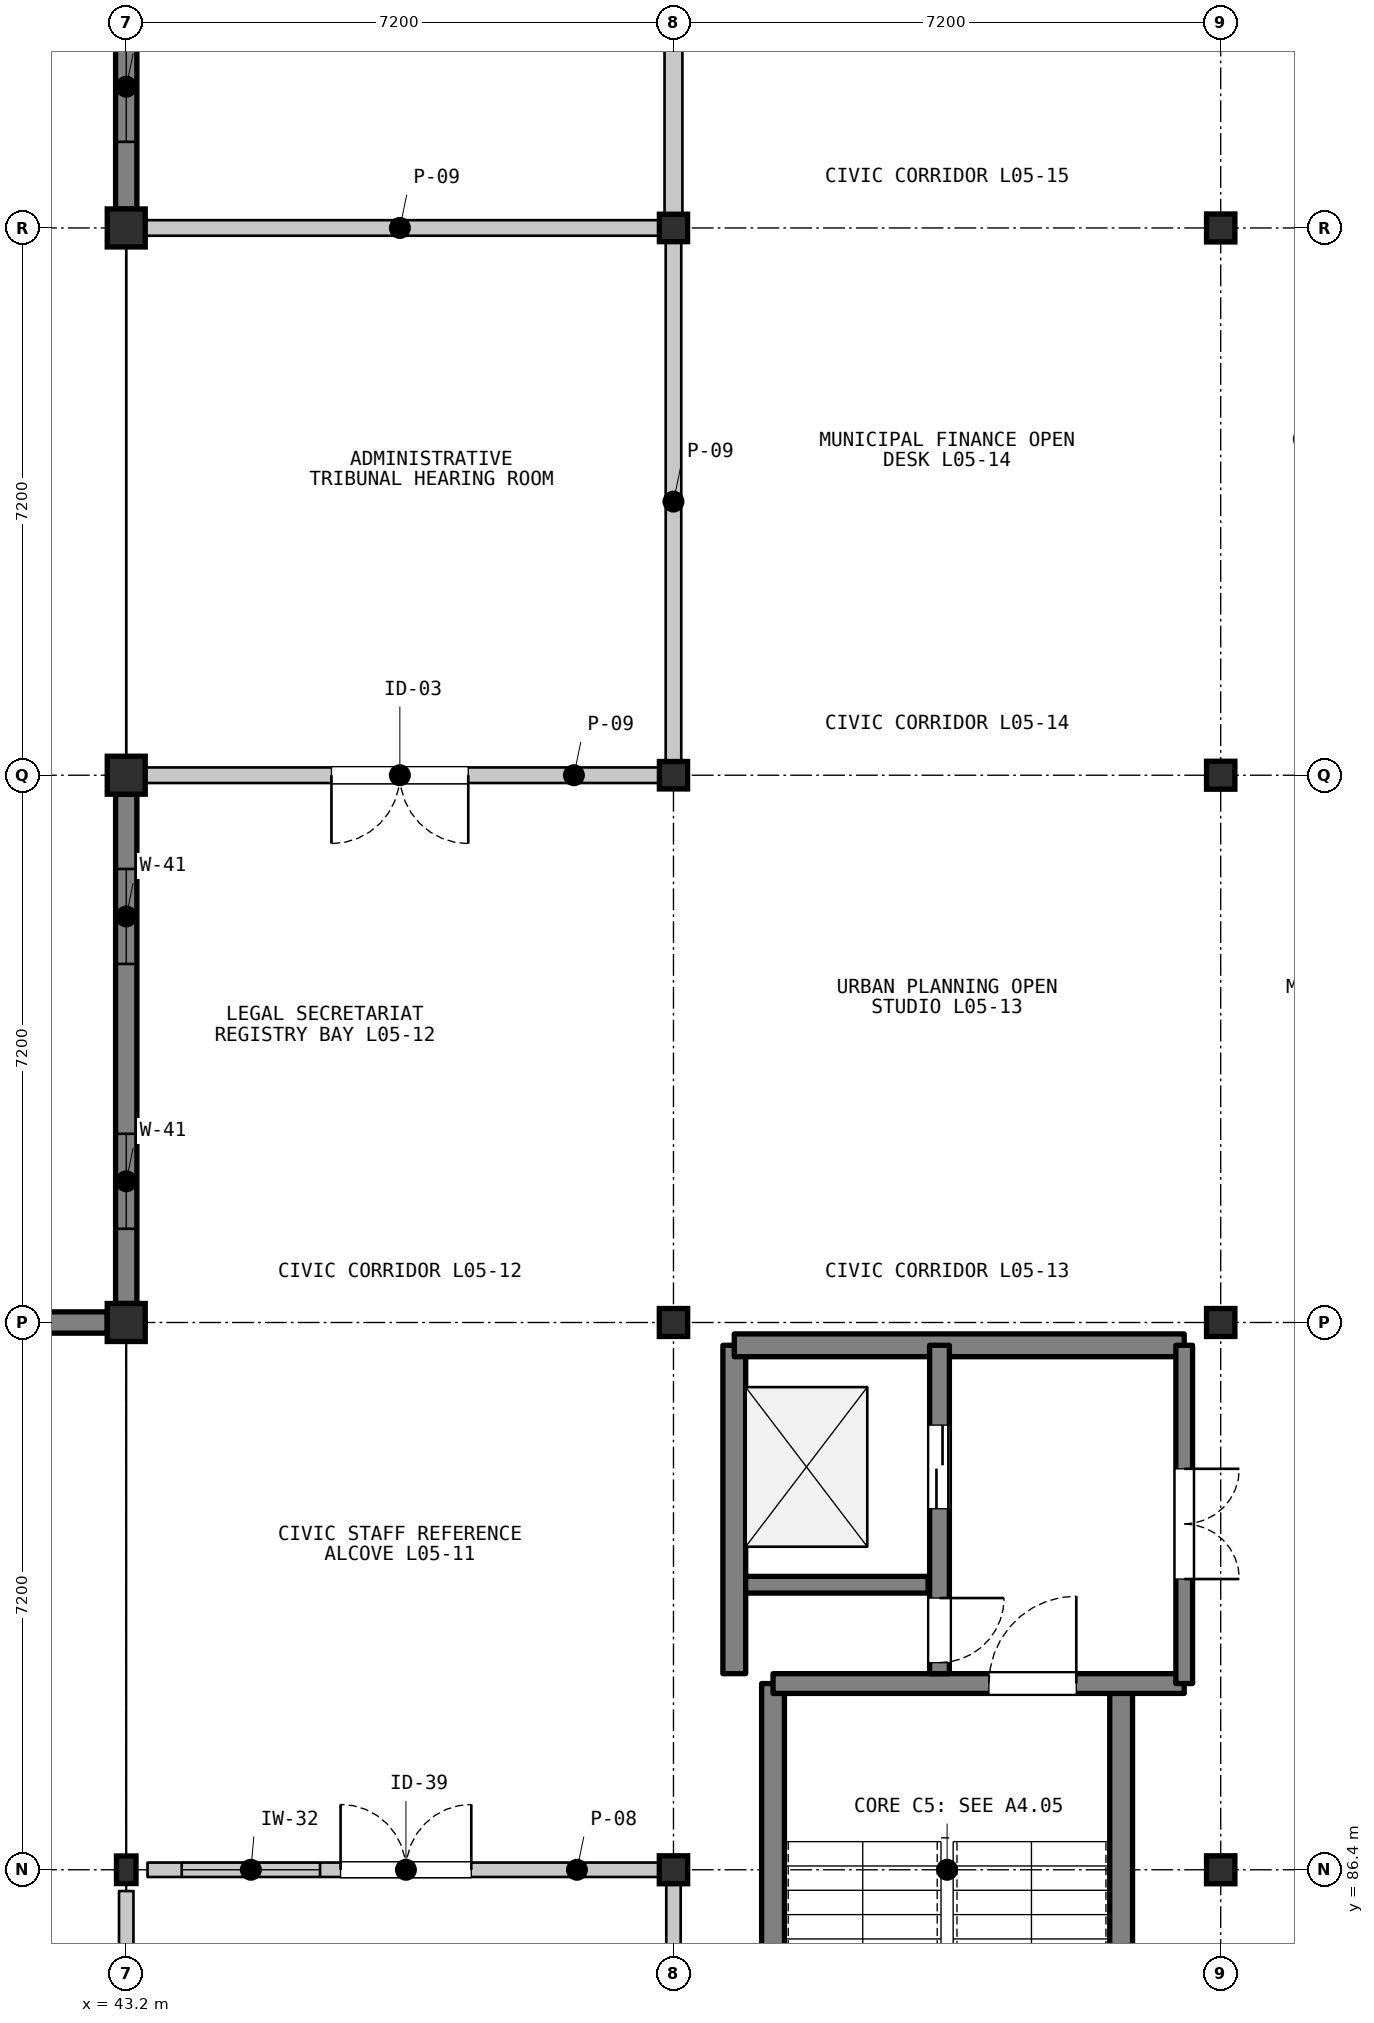
"""IFC4 building model, lengths in metres.
Left out: names, types, materials, properties, quantities, classifications, styles, units other than length and angle.
Written with IfcOpenShell. Run it as: python <this file> out.ifc"""

import sys

from ifc_helpers import new_model, si_unit, direction, frame, frame_2d, origin, origin_2d, place, context, subcontext, project, spatial, rectangle, i_section, extrude, element, fill, save


model = new_model("IFC4")
c1 = context("Model", 3, precision=1e-05, world=origin(), true_north=direction((0.0, 1.0)))
c2 = subcontext(c1, "Body", "Model", "MODEL_VIEW")
j1 = project(units=[si_unit("LENGTHUNIT", "METRE"), si_unit("PLANEANGLEUNIT", "RADIAN")], contexts=[c1])
p1 = place(None, origin())
s1 = spatial("IfcSite", under=j1, at=p1, CompositionType="ELEMENT")
p2 = place(p1, origin())
s2 = spatial("IfcBuilding", under=s1, at=p2, CompositionType="ELEMENT")
p3 = place(p2, frame((0.0, 0.0, 18.0)))
s3 = spatial("IfcBuildingStorey", under=s2, at=p3, CompositionType="ELEMENT", Elevation=18.0)
p4 = place(p3, frame((43.2, 86.4, 0.0), z_axis=(0.0, 0.0, 1.0), x_axis=(1.0, 0.0, 0.0)))
e1 = element("IfcColumn", 1, at=p4, inside=s3, PredefinedType="COLUMN", context=c2, shape_type="SweptSolid", body=[
    extrude(i_section(OverallWidth=0.257, OverallDepth=0.363, WebThickness=0.013, FlangeThickness=0.022, FilletRadius=0.015, at=origin_2d()), origin(), (0.0, 0.0, 1.0), 3.9),
])
for number, where, z_axis, x_axis in (
    (2, (43.2, 93.6, 0.0), (0.0, 0.0, 1.0), (1.0, 0.0, 0.0)),
    (3, (43.2, 100.8, 0.0), (0.0, 0.0, 1.0), (1.0, 0.0, 0.0)),
    (4, (43.2, 108.0, 0.0), (0.0, 0.0, 1.0), (1.0, 0.0, 0.0)),
):
    element("IfcColumn", number, at=place(p3, frame(where, z_axis=z_axis, x_axis=x_axis)), inside=s3, PredefinedType="COLUMN", context=c2, shape_type="SweptSolid", body=[
        extrude(rectangle(XDim=0.5, YDim=0.5, at=origin_2d()), origin(), (0.0, 0.0, 1.0), 3.9),
    ])
for number, where, z_axis, x_axis in (
    (5, (50.4, 86.4, 0.0), (0.0, 0.0, 1.0), (1.0, 0.0, 0.0)),
    (6, (50.4, 93.6, 0.0), (0.0, 0.0, 1.0), (1.0, 0.0, 0.0)),
):
    element("IfcColumn", number, at=place(p3, frame(where, z_axis=z_axis, x_axis=x_axis)), inside=s3, PredefinedType="COLUMN", context=c2, shape_type="SweptSolid", body=[
        extrude(i_section(OverallWidth=0.373, OverallDepth=0.368, WebThickness=0.015, FlangeThickness=0.024, FilletRadius=0.015, at=origin_2d()), origin(), (0.0, 0.0, 1.0), 3.9),
    ])
for number, where, z_axis, x_axis in (
    (7, (50.4, 100.8, 0.0), (0.0, 0.0, 1.0), (1.0, 0.0, 0.0)),
    (8, (50.4, 108.0, 0.0), (0.0, 0.0, 1.0), (1.0, 0.0, 0.0)),
):
    element("IfcColumn", number, at=place(p3, frame(where, z_axis=z_axis, x_axis=x_axis)), inside=s3, PredefinedType="COLUMN", context=c2, shape_type="SweptSolid", body=[
        extrude(i_section(OverallWidth=0.371, OverallDepth=0.361, WebThickness=0.012, FlangeThickness=0.02, FilletRadius=0.015, at=origin_2d()), origin(), (0.0, 0.0, 1.0), 3.9),
    ])
for number, where, z_axis, x_axis in (
    (9, (57.6, 86.4, 0.0), (0.0, 0.0, 1.0), (1.0, 0.0, 0.0)),
    (10, (57.6, 93.6, 0.0), (0.0, 0.0, 1.0), (1.0, 0.0, 0.0)),
    (11, (57.6, 100.8, 0.0), (0.0, 0.0, 1.0), (1.0, 0.0, 0.0)),
    (12, (57.6, 108.0, 0.0), (0.0, 0.0, 1.0), (1.0, 0.0, 0.0)),
):
    element("IfcColumn", number, at=place(p3, frame(where, z_axis=z_axis, x_axis=x_axis)), inside=s3, PredefinedType="COLUMN", context=c2, shape_type="SweptSolid", body=[
        extrude(i_section(OverallWidth=0.373, OverallDepth=0.368, WebThickness=0.015, FlangeThickness=0.024, FilletRadius=0.015, at=origin_2d()), origin(), (0.0, 0.0, 1.0), 3.9),
    ])
p5 = place(p3, frame((36.25, 93.6, 0.0), z_axis=(0.0, 0.0, 1.0), x_axis=(1.0, 0.0, 0.0)))
e13 = element("IfcWall", 13, at=p5, inside=s3, PredefinedType="SOLIDWALL", context=c2, shape_type="SweptSolid", body=[
    extrude(rectangle(XDim=6.7, YDim=0.28, at=frame_2d((3.35, 0.0))), origin(), (0.0, 0.0, 1.0), 3.172),
])
p6 = place(p5, frame((1.008, 0.0, 0.95)))
e14 = element("IfcOpeningElement", 14, at=p6, cuts=e13, PredefinedType="OPENING", context=c2, shape_type="SweptSolid", body=[
    extrude(rectangle(XDim=1.2, YDim=1.7, at=frame_2d((0.6, 0.85))), frame((0.0, 0.15, 0.0), z_axis=(0.0, -1.0, 0.0), x_axis=(1.0, 0.0, 0.0)), (0.0, 0.0, 1.0), 0.3),
])
p7 = place(p5, frame((4.492, 0.0, 0.95)))
e15 = element("IfcOpeningElement", 15, at=p7, cuts=e13, PredefinedType="OPENING", context=c2, shape_type="SweptSolid", body=[
    extrude(rectangle(XDim=1.2, YDim=1.7, at=frame_2d((0.6, 0.85))), frame((0.0, 0.15, 0.0), z_axis=(0.0, -1.0, 0.0), x_axis=(1.0, 0.0, 0.0)), (0.0, 0.0, 1.0), 0.3),
])
p8 = place(p3, frame((43.2, 93.85, 0.0), z_axis=(0.0, 0.0, 1.0), x_axis=(0.0, 1.0, 0.0)))
e16 = element("IfcWall", 16, at=p8, inside=s3, PredefinedType="SOLIDWALL", context=c2, shape_type="SweptSolid", body=[
    extrude(rectangle(XDim=6.7, YDim=0.28, at=frame_2d((3.35, 0.0))), origin(), (0.0, 0.0, 1.0), 3.172),
])
p9 = place(p8, frame((0.983, 0.0, 0.95)))
e17 = element("IfcOpeningElement", 17, at=p9, cuts=e16, PredefinedType="OPENING", context=c2, shape_type="SweptSolid", body=[
    extrude(rectangle(XDim=1.25, YDim=1.85, at=frame_2d((0.625, 0.925))), frame((0.0, 0.15, 0.0), z_axis=(0.0, -1.0, 0.0), x_axis=(1.0, 0.0, 0.0)), (0.0, 0.0, 1.0), 0.3),
])
p10 = place(p8, frame((4.467, 0.0, 0.95)))
e18 = element("IfcOpeningElement", 18, at=p10, cuts=e16, PredefinedType="OPENING", context=c2, shape_type="SweptSolid", body=[
    extrude(rectangle(XDim=1.25, YDim=1.85, at=frame_2d((0.625, 0.925))), frame((0.0, 0.15, 0.0), z_axis=(0.0, -1.0, 0.0), x_axis=(1.0, 0.0, 0.0)), (0.0, 0.0, 1.0), 0.3),
])
p11 = place(p3, frame((43.2, 108.25, 0.0), z_axis=(0.0, 0.0, 1.0), x_axis=(0.0, 1.0, 0.0)))
e19 = element("IfcWall", 19, at=p11, inside=s3, PredefinedType="SOLIDWALL", context=c2, shape_type="SweptSolid", body=[
    extrude(rectangle(XDim=6.7, YDim=0.28, at=frame_2d((3.35, 0.0))), origin(), (0.0, 0.0, 1.0), 3.172),
])
p12 = place(p11, frame((0.883, 0.0, 0.95)))
e20 = element("IfcOpeningElement", 20, at=p12, cuts=e19, PredefinedType="OPENING", context=c2, shape_type="SweptSolid", body=[
    extrude(rectangle(XDim=1.45, YDim=1.85, at=frame_2d((0.725, 0.925))), frame((0.0, 0.15, 0.0), z_axis=(0.0, -1.0, 0.0), x_axis=(1.0, 0.0, 0.0)), (0.0, 0.0, 1.0), 0.3),
])
p13 = place(p11, frame((4.367, 0.0, 0.95)))
e21 = element("IfcOpeningElement", 21, at=p13, cuts=e19, PredefinedType="OPENING", context=c2, shape_type="SweptSolid", body=[
    extrude(rectangle(XDim=1.45, YDim=1.85, at=frame_2d((0.725, 0.925))), frame((0.0, 0.15, 0.0), z_axis=(0.0, -1.0, 0.0), x_axis=(1.0, 0.0, 0.0)), (0.0, 0.0, 1.0), 0.3),
])
for number, where, z_axis, x_axis in (
    (22, (51.71, 79.55, 0.0), (0.0, 0.0, 1.0), (0.0, 1.0, 0.0)),
    (23, (56.29, 79.55, 0.0), (0.0, 0.0, 1.0), (0.0, 1.0, 0.0)),
):
    element("IfcWall", number, at=place(p3, frame(where, z_axis=z_axis, x_axis=x_axis)), inside=s3, PredefinedType="SHEAR", context=c2, shape_type="SweptSolid", body=[
        extrude(rectangle(XDim=9.3, YDim=0.3, at=frame_2d((4.65, 0.0))), origin(), (0.0, 0.0, 1.0), 3.72),
    ])
p14 = place(p3, frame((51.71, 88.85, 0.0), z_axis=(0.0, 0.0, 1.0), x_axis=(1.0, 0.0, 0.0)))
e24 = element("IfcWall", 24, at=p14, inside=s3, PredefinedType="SHEAR", context=c2, shape_type="SweptSolid", body=[
    extrude(rectangle(XDim=5.41, YDim=0.26, at=frame_2d((2.705, 0.0))), origin(), (0.0, 0.0, 1.0), 3.72),
])
p15 = place(p14, frame((2.84, 0.0, 0.0)))
e25 = element("IfcOpeningElement", 25, at=p15, cuts=e24, PredefinedType="OPENING", context=c2, shape_type="SweptSolid", body=[
    extrude(rectangle(XDim=1.15, YDim=2.15, at=frame_2d((0.575, 1.075))), frame((0.0, 0.14, 0.0), z_axis=(0.0, -1.0, 0.0), x_axis=(1.0, 0.0, 0.0)), (0.0, 0.0, 1.0), 0.28),
])
p16 = place(p3, frame((51.2, 88.98, 0.0), z_axis=(0.0, 0.0, 1.0), x_axis=(0.0, 1.0, 0.0)))
e26 = element("IfcWall", 26, at=p16, inside=s3, PredefinedType="SHEAR", context=c2, shape_type="SweptSolid", body=[
    extrude(rectangle(XDim=4.32, YDim=0.3, at=frame_2d((2.16, 0.0))), origin(), (0.0, 0.0, 1.0), 3.72),
])
p17 = place(p3, frame((51.2, 93.3, 0.0), z_axis=(0.0, 0.0, 1.0), x_axis=(1.0, 0.0, 0.0)))
e27 = element("IfcWall", 27, at=p17, inside=s3, PredefinedType="SHEAR", context=c2, shape_type="SweptSolid", body=[
    extrude(rectangle(XDim=5.92, YDim=0.3, at=frame_2d((2.96, 0.0))), origin(), (0.0, 0.0, 1.0), 3.72),
])
p18 = place(p3, frame((51.35, 90.15, 0.0), z_axis=(0.0, 0.0, 1.0), x_axis=(1.0, 0.0, 0.0)))
e28 = element("IfcWall", 28, at=p18, inside=s3, PredefinedType="SHEAR", context=c2, shape_type="SweptSolid", body=[
    extrude(rectangle(XDim=2.4, YDim=0.22, at=frame_2d((1.2, 0.0))), origin(), (0.0, 0.0, 1.0), 3.72),
])
p19 = place(p3, frame((53.9, 93.3, 0.0), z_axis=(0.0, 0.0, 1.0), x_axis=(0.0, -1.0, 0.0)))
e29 = element("IfcWall", 29, at=p19, inside=s3, PredefinedType="SHEAR", context=c2, shape_type="SweptSolid", body=[
    extrude(rectangle(XDim=4.32, YDim=0.26, at=frame_2d((2.16, 0.0))), origin(), (0.0, 0.0, 1.0), 3.72),
])
p20 = place(p19, frame((1.05, 0.0, 0.0)))
e30 = element("IfcOpeningElement", 30, at=p20, cuts=e29, PredefinedType="OPENING", context=c2, shape_type="SweptSolid", body=[
    extrude(rectangle(XDim=1.1, YDim=2.15, at=frame_2d((0.55, 1.075))), frame((0.0, 0.14, 0.0), z_axis=(0.0, -1.0, 0.0), x_axis=(1.0, 0.0, 0.0)), (0.0, 0.0, 1.0), 0.28),
])
p21 = place(p19, frame((3.325, 0.0, 0.0)))
e31 = element("IfcOpeningElement", 31, at=p21, cuts=e29, PredefinedType="OPENING", context=c2, shape_type="SweptSolid", body=[
    extrude(rectangle(XDim=0.85, YDim=2.05, at=frame_2d((0.425, 1.025))), frame((0.0, 0.14, 0.0), z_axis=(0.0, -1.0, 0.0), x_axis=(1.0, 0.0, 0.0)), (0.0, 0.0, 1.0), 0.28),
])
p22 = place(p3, frame((57.12, 93.3, 0.0), z_axis=(0.0, 0.0, 1.0), x_axis=(0.0, -1.0, 0.0)))
e32 = element("IfcWall", 32, at=p22, inside=s3, PredefinedType="SHEAR", context=c2, shape_type="SweptSolid", body=[
    extrude(rectangle(XDim=4.45, YDim=0.22, at=frame_2d((2.225, 0.0))), origin(), (0.0, 0.0, 1.0), 3.72),
])
p23 = place(p22, frame((1.625, 0.0, 0.0)))
e33 = element("IfcOpeningElement", 33, at=p23, cuts=e32, PredefinedType="OPENING", context=c2, shape_type="SweptSolid", body=[
    extrude(rectangle(XDim=1.45, YDim=2.2, at=frame_2d((0.725, 1.1))), frame((0.0, 0.12, 0.0), z_axis=(0.0, -1.0, 0.0), x_axis=(1.0, 0.0, 0.0)), (0.0, 0.0, 1.0), 0.24),
])
p24 = place(p3, frame((43.48, 86.4, 0.0), z_axis=(0.0, 0.0, 1.0), x_axis=(1.0, 0.0, 0.0)))
e34 = element("IfcWall", 34, at=p24, inside=s3, PredefinedType="PARTITIONING", context=c2, shape_type="SweptSolid", body=[
    extrude(rectangle(XDim=6.8, YDim=0.19, at=frame_2d((3.4, 0.0))), origin(), (0.0, 0.0, 1.0), 3.088),
])
p25 = place(p24, frame((2.54, 0.0, 0.0)))
e35 = element("IfcOpeningElement", 35, at=p25, cuts=e34, PredefinedType="OPENING", context=c2, shape_type="SweptSolid", body=[
    extrude(rectangle(XDim=1.72, YDim=2.32, at=frame_2d((0.86, 1.16))), frame((0.0, 0.105, 0.0), z_axis=(0.0, -1.0, 0.0), x_axis=(1.0, 0.0, 0.0)), (0.0, 0.0, 1.0), 0.21),
])
p26 = place(p24, frame((0.45, 0.0, 1.05)))
e36 = element("IfcOpeningElement", 36, at=p26, cuts=e34, PredefinedType="OPENING", context=c2, shape_type="SweptSolid", body=[
    extrude(rectangle(XDim=1.82, YDim=1.02, at=frame_2d((0.91, 0.51))), frame((0.0, 0.105, 0.0), z_axis=(0.0, -1.0, 0.0), x_axis=(1.0, 0.0, 0.0)), (0.0, 0.0, 1.0), 0.21),
])
p27 = place(p3, frame((43.2, 79.48, 0.0), z_axis=(0.0, 0.0, 1.0), x_axis=(0.0, 1.0, 0.0)))
e37 = element("IfcWall", 37, at=p27, inside=s3, PredefinedType="PARTITIONING", context=c2, shape_type="SweptSolid", body=[
    extrude(rectangle(XDim=6.64, YDim=0.19, at=frame_2d((3.32, 0.0))), origin(), (0.0, 0.0, 1.0), 3.157),
])
p28 = place(p3, frame((50.4, 86.28, 0.0), z_axis=(0.0, 0.0, 1.0), x_axis=(0.0, -1.0, 0.0)))
e38 = element("IfcWall", 38, at=p28, inside=s3, PredefinedType="PARTITIONING", context=c2, shape_type="SweptSolid", body=[
    extrude(rectangle(XDim=6.96, YDim=0.19, at=frame_2d((3.48, 0.0))), origin(), (0.0, 0.0, 1.0), 3.088),
])
p29 = place(p3, frame((50.28, 100.8, 0.0), z_axis=(0.0, 0.0, 1.0), x_axis=(-1.0, 0.0, 0.0)))
e39 = element("IfcWall", 39, at=p29, inside=s3, PredefinedType="PARTITIONING", context=c2, shape_type="SweptSolid", body=[
    extrude(rectangle(XDim=6.96, YDim=0.205, at=frame_2d((3.48, 0.0))), origin(), (0.0, 0.0, 1.0), 3.088),
])
p30 = place(p29, frame((2.58, 0.0, 0.0)))
e40 = element("IfcOpeningElement", 40, at=p30, cuts=e39, PredefinedType="OPENING", context=c2, shape_type="SweptSolid", body=[
    extrude(rectangle(XDim=1.8, YDim=2.4, at=frame_2d((0.9, 1.2))), frame((0.0, 0.113, 0.0), z_axis=(0.0, -1.0, 0.0), x_axis=(1.0, 0.0, 0.0)), (0.0, 0.0, 1.0), 0.225),
])
for number, where, z_axis, x_axis in (
    (41, (43.32, 108.0, 0.0), (0.0, 0.0, 1.0), (1.0, 0.0, 0.0)),
    (42, (50.4, 107.88, 0.0), (0.0, 0.0, 1.0), (0.0, -1.0, 0.0)),
):
    element("IfcWall", number, at=place(p3, frame(where, z_axis=z_axis, x_axis=x_axis)), inside=s3, PredefinedType="PARTITIONING", context=c2, shape_type="SweptSolid", body=[
        extrude(rectangle(XDim=6.96, YDim=0.205, at=frame_2d((3.48, 0.0))), origin(), (0.0, 0.0, 1.0), 3.088),
    ])
p31 = place(p3, frame((50.4, 115.08, 0.0), z_axis=(0.0, 0.0, 1.0), x_axis=(0.0, -1.0, 0.0)))
e43 = element("IfcWall", 43, at=p31, inside=s3, PredefinedType="PARTITIONING", context=c2, shape_type="SweptSolid", body=[
    extrude(rectangle(XDim=6.96, YDim=0.235, at=frame_2d((3.48, 0.0))), origin(), (0.0, 0.0, 1.0), 3.088),
])
p32 = place(p31, frame((2.83, 0.0, 0.0)))
e44 = element("IfcOpeningElement", 44, at=p32, cuts=e43, PredefinedType="OPENING", context=c2, shape_type="SweptSolid", body=[
    extrude(rectangle(XDim=1.3, YDim=2.2, at=frame_2d((0.65, 1.1))), frame((0.0, 0.127, 0.0), z_axis=(0.0, -1.0, 0.0), x_axis=(1.0, 0.0, 0.0)), (0.0, 0.0, 1.0), 0.255),
])
p33 = place(p9, origin())
e45 = element("IfcWindow", 45, at=p33, inside=s3, PartitioningType="SINGLE_PANEL", PredefinedType="WINDOW", context=c2, shape_type="SweptSolid", body=[
    extrude(rectangle(XDim=1.25, YDim=1.85, at=frame_2d((0.625, 0.925))), frame((0.0, 0.03, 0.0), z_axis=(0.0, -1.0, 0.0), x_axis=(1.0, 0.0, 0.0)), (0.0, 0.0, 1.0), 0.06),
])
fill(e17, e45)
p34 = place(p10, origin())
e46 = element("IfcWindow", 46, at=p34, inside=s3, PartitioningType="SINGLE_PANEL", PredefinedType="WINDOW", context=c2, shape_type="SweptSolid", body=[
    extrude(rectangle(XDim=1.25, YDim=1.85, at=frame_2d((0.625, 0.925))), frame((0.0, 0.03, 0.0), z_axis=(0.0, -1.0, 0.0), x_axis=(1.0, 0.0, 0.0)), (0.0, 0.0, 1.0), 0.06),
])
fill(e18, e46)
p35 = place(p12, origin())
e47 = element("IfcWindow", 47, at=p35, inside=s3, PartitioningType="SINGLE_PANEL", PredefinedType="WINDOW", context=c2, shape_type="SweptSolid", body=[
    extrude(rectangle(XDim=1.45, YDim=1.85, at=frame_2d((0.725, 0.925))), frame((0.0, 0.03, 0.0), z_axis=(0.0, -1.0, 0.0), x_axis=(1.0, 0.0, 0.0)), (0.0, 0.0, 1.0), 0.06),
])
fill(e20, e47)
p36 = place(p15, origin())
e48 = element("IfcDoor", 48, at=p36, inside=s3, OperationType="SINGLE_SWING_RIGHT", PredefinedType="DOOR", context=c2, shape_type="SweptSolid", body=[
    extrude(rectangle(XDim=1.15, YDim=2.15, at=frame_2d((0.575, 1.075))), frame((0.0, 0.025, 0.0), z_axis=(0.0, -1.0, 0.0), x_axis=(1.0, 0.0, 0.0)), (0.0, 0.0, 1.0), 0.05),
])
fill(e25, e48)
p37 = place(p20, origin())
e49 = element("IfcDoor", 49, at=p37, inside=s3, OperationType="DOUBLE_DOOR_SLIDING", PredefinedType="DOOR", context=c2, shape_type="SweptSolid", body=[
    extrude(rectangle(XDim=1.1, YDim=2.15, at=frame_2d((0.55, 1.075))), frame((0.0, 0.025, 0.0), z_axis=(0.0, -1.0, 0.0), x_axis=(1.0, 0.0, 0.0)), (0.0, 0.0, 1.0), 0.05),
])
fill(e30, e49)
p38 = place(p21, origin())
e50 = element("IfcDoor", 50, at=p38, inside=s3, OperationType="SINGLE_SWING_LEFT", PredefinedType="DOOR", context=c2, shape_type="SweptSolid", body=[
    extrude(rectangle(XDim=0.85, YDim=2.05, at=frame_2d((0.425, 1.025))), frame((0.0, 0.025, 0.0), z_axis=(0.0, -1.0, 0.0), x_axis=(1.0, 0.0, 0.0)), (0.0, 0.0, 1.0), 0.05),
])
fill(e31, e50)
p39 = place(p23, origin())
e51 = element("IfcDoor", 51, at=p39, inside=s3, OperationType="DOUBLE_DOOR_SINGLE_SWING", PredefinedType="DOOR", context=c2, shape_type="SweptSolid", body=[
    extrude(rectangle(XDim=1.45, YDim=2.2, at=frame_2d((0.725, 1.1))), frame((0.0, 0.025, 0.0), z_axis=(0.0, -1.0, 0.0), x_axis=(1.0, 0.0, 0.0)), (0.0, 0.0, 1.0), 0.05),
])
fill(e33, e51)
p40 = place(p25, origin())
e52 = element("IfcDoor", 52, at=p40, inside=s3, OperationType="DOUBLE_DOOR_SINGLE_SWING", PredefinedType="DOOR", context=c2, shape_type="SweptSolid", body=[
    extrude(rectangle(XDim=1.72, YDim=2.32, at=frame_2d((0.86, 1.16))), frame((0.0, 0.025, 0.0), z_axis=(0.0, -1.0, 0.0), x_axis=(1.0, 0.0, 0.0)), (0.0, 0.0, 1.0), 0.05),
])
fill(e35, e52)
p41 = place(p26, origin())
e53 = element("IfcWindow", 53, at=p41, inside=s3, PartitioningType="SINGLE_PANEL", PredefinedType="WINDOW", context=c2, shape_type="SweptSolid", body=[
    extrude(rectangle(XDim=1.82, YDim=1.02, at=frame_2d((0.91, 0.51))), frame((0.0, 0.03, 0.0), z_axis=(0.0, -1.0, 0.0), x_axis=(1.0, 0.0, 0.0)), (0.0, 0.0, 1.0), 0.06),
])
fill(e36, e53)
p42 = place(p30, origin())
e54 = element("IfcDoor", 54, at=p42, inside=s3, OperationType="DOUBLE_DOOR_SINGLE_SWING", PredefinedType="DOOR", context=c2, shape_type="SweptSolid", body=[
    extrude(rectangle(XDim=1.8, YDim=2.4, at=frame_2d((0.9, 1.2))), frame((0.0, 0.025, 0.0), z_axis=(0.0, -1.0, 0.0), x_axis=(1.0, 0.0, 0.0)), (0.0, 0.0, 1.0), 0.05),
])
fill(e40, e54)
save(model, sys.argv[1])
